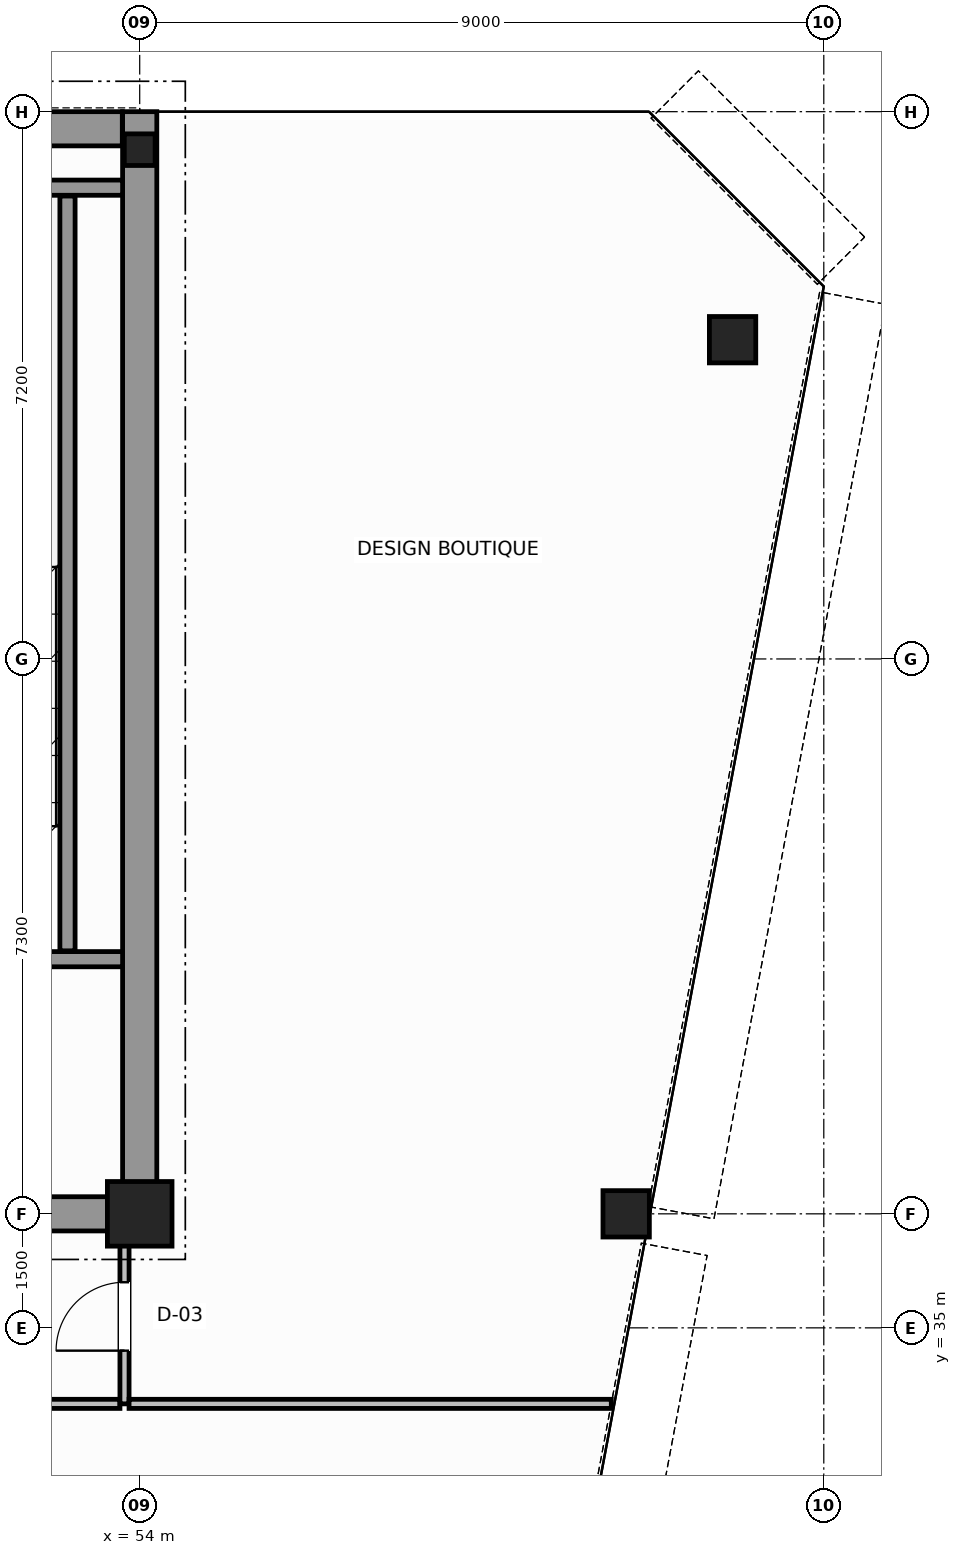
"""IFC4 building model, lengths in metres.
Left out: names, types, materials, properties, quantities, classifications, styles, units other than length and angle.
Written with IfcOpenShell. Run it as: python <this file> out.ifc"""

import sys

from ifc_helpers import new_model, si_unit, direction, frame, frame_2d, origin, origin_2d, place, context, subcontext, project, spatial, rectangle, hollow_circle, i_section, extrude, source, transform, mapped, element, fill, save


model = new_model("IFC4")
c1 = context("Model", 3, precision=1e-05, world=origin(), true_north=direction((0.0, 1.0)))
c2 = subcontext(c1, "Body", "Model", "MODEL_VIEW")
j1 = project(units=[si_unit("LENGTHUNIT", "METRE"), si_unit("PLANEANGLEUNIT", "RADIAN")], contexts=[c1])
p1 = place(None, origin())
s1 = spatial("IfcSite", under=j1, at=p1, CompositionType="ELEMENT")
p2 = place(p1, origin())
s2 = spatial("IfcBuilding", under=s1, at=p2, CompositionType="ELEMENT")
p3 = place(p2, frame((0.0, 0.0, 291.6)))
s3 = spatial("IfcBuildingStorey", under=s2, at=p3, CompositionType="ELEMENT", Elevation=291.6)
m1 = source(origin(), c2, "Body", "SweptSolid", [
    extrude(rectangle(XDim=0.85, YDim=0.85, at=origin_2d()), origin(), (0.0, 0.0, 1.0), 3.8),
])
p4 = place(p3, frame((54.0, 36.5, 0.0), z_axis=(0.0, 0.0, 1.0), x_axis=(1.0, 0.0, 0.0)))
e1 = element("IfcColumn", 1, at=p4, inside=s3, PredefinedType="COLUMN", context=c2, shape_type="MappedRepresentation", body=[
    mapped(m1, transform((0.0, 0.0, 0.0), scale=1.0)),
])
m2 = source(origin(), c2, "Body", "SweptSolid", [
    extrude(i_section(OverallWidth=0.406, OverallDepth=0.416, WebThickness=0.03, FlangeThickness=0.042, FilletRadius=0.015, at=origin_2d()), origin(), (0.0, 0.0, 1.0), 3.8),
])
p5 = place(p3, frame((54.0, 50.5, 0.0), z_axis=(0.0, 0.0, 1.0), x_axis=(1.0, 0.0, 0.0)))
e2 = element("IfcColumn", 2, at=p5, inside=s3, PredefinedType="COLUMN", context=c2, shape_type="MappedRepresentation", body=[
    mapped(m2, transform((0.0, 0.0, 0.0), scale=1.0)),
])
m3 = source(origin(), c2, "Body", "SweptSolid", [
    extrude(hollow_circle(Radius=0.305, WallThickness=0.03, at=origin_2d()), origin(), (0.0, 0.0, 1.0), 3.8),
])
for number, where, z_axis, x_axis in (
    (3, (61.8, 48.0, 0.0), (0.0, 0.0, 1.0), (1.0, 0.0, 0.0)),
    (4, (60.4, 36.5, 0.0), (0.0, 0.0, 1.0), (1.0, 0.0, 0.0)),
):
    element("IfcColumn", number, at=place(p3, frame(where, z_axis=z_axis, x_axis=x_axis)), inside=s3, PredefinedType="COLUMN", context=c2, shape_type="MappedRepresentation", body=[
        mapped(m3, transform((0.0, 0.0, 0.0), scale=1.0)),
    ])
p6 = place(p3, frame((34.002, 50.775, 0.0), z_axis=(0.0, 0.0, 1.0), x_axis=(1.0, 0.0, 0.0)))
e5 = element("IfcWall", 5, at=p6, inside=s3, PredefinedType="SHEAR", context=c2, shape_type="SweptSolid", body=[
    extrude(rectangle(XDim=19.769, YDim=0.45, at=frame_2d((9.885, 0.0))), origin(), (0.0, 0.0, 1.0), 3.8),
])
p7 = place(p3, frame((54.0, 36.5, 0.0), z_axis=(0.0, 0.0, 1.0), x_axis=(0.0, 1.0, 0.0)))
e6 = element("IfcWall", 6, at=p7, inside=s3, PredefinedType="SHEAR", context=c2, shape_type="SweptSolid", body=[
    extrude(rectangle(XDim=14.5, YDim=0.45, at=frame_2d((7.25, 0.0))), origin(), (0.0, 0.0, 1.0), 3.8),
])
p8 = place(p3, frame((49.8, 36.5, 0.0), z_axis=(0.0, 0.0, 1.0), x_axis=(1.0, 0.0, 0.0)))
e7 = element("IfcWall", 7, at=p8, inside=s3, PredefinedType="SHEAR", context=c2, shape_type="SweptSolid", body=[
    extrude(rectangle(XDim=3.955, YDim=0.45, at=frame_2d((1.978, 0.0))), origin(), (0.0, 0.0, 1.0), 2.58),
])
p9 = place(p3, frame((49.4, 39.85, 0.0), z_axis=(0.0, 0.0, 1.0), x_axis=(1.0, 0.0, 0.0)))
e8 = element("IfcWall", 8, at=p9, inside=s3, PredefinedType="SOLIDWALL", context=c2, shape_type="SweptSolid", body=[
    extrude(rectangle(XDim=4.375, YDim=0.2, at=frame_2d((2.188, 0.0))), origin(), (0.0, 0.0, 1.0), 3.8),
])
p10 = place(p9, frame((1.325, 0.0, 0.0)))
e9 = element("IfcOpeningElement", 9, at=p10, cuts=e8, PredefinedType="OPENING", context=c2, shape_type="SweptSolid", body=[
    extrude(rectangle(XDim=1.1, YDim=2.15, at=frame_2d((0.55, 1.075))), frame((0.0, 0.11, 0.0), z_axis=(0.0, -1.0, 0.0), x_axis=(1.0, 0.0, 0.0)), (0.0, 0.0, 1.0), 0.22),
])
p11 = place(p3, frame((49.4, 50.0, 0.0), z_axis=(0.0, 0.0, 1.0), x_axis=(1.0, 0.0, 0.0)))
e10 = element("IfcWall", 10, at=p11, inside=s3, PredefinedType="SOLIDWALL", context=c2, shape_type="SweptSolid", body=[
    extrude(rectangle(XDim=4.375, YDim=0.2, at=frame_2d((2.188, 0.0))), origin(), (0.0, 0.0, 1.0), 3.8),
])
p12 = place(p3, frame((53.05, 39.96, 0.0), z_axis=(0.0, 0.0, 1.0), x_axis=(0.0, 1.0, 0.0)))
e11 = element("IfcWall", 11, at=p12, inside=s3, PredefinedType="SOLIDWALL", context=c2, shape_type="SweptSolid", body=[
    extrude(rectangle(XDim=9.93, YDim=0.2, at=frame_2d((4.965, 0.0))), origin(), (0.0, 0.0, 1.0), 3.8),
])
p13 = place(p3, frame((34.86, 34.0, 0.0), z_axis=(0.0, 0.0, 1.0), x_axis=(1.0, 0.0, 0.0)))
e12 = element("IfcWall", 12, at=p13, inside=s3, PredefinedType="PARTITIONING", context=c2, shape_type="SweptSolid", body=[
    extrude(rectangle(XDim=18.88, YDim=0.12, at=frame_2d((9.44, 0.0))), origin(), (0.0, 0.0, 1.0), 3.58),
])
p14 = place(p3, frame((53.8, 34.0, 0.0), z_axis=(0.0, 0.0, 1.0), x_axis=(0.0, 1.0, 0.0)))
e13 = element("IfcWall", 13, at=p14, inside=s3, PredefinedType="PARTITIONING", context=c2, shape_type="SweptSolid", body=[
    extrude(rectangle(XDim=2.44, YDim=0.12, at=frame_2d((1.22, 0.0))), origin(), (0.0, 0.0, 1.0), 3.58),
])
p15 = place(p14, frame((0.7, 0.0, 0.0)))
e14 = element("IfcOpeningElement", 14, at=p15, cuts=e13, PredefinedType="OPENING", context=c2, shape_type="SweptSolid", body=[
    extrude(rectangle(XDim=0.9, YDim=2.15, at=frame_2d((0.45, 1.075))), frame((0.0, 0.07, 0.0), z_axis=(0.0, -1.0, 0.0), x_axis=(1.0, 0.0, 0.0)), (0.0, 0.0, 1.0), 0.14),
])
p16 = place(p3, frame((53.86, 34.0, 0.0), z_axis=(0.0, 0.0, 1.0), x_axis=(1.0, 0.0, 0.0)))
e15 = element("IfcWall", 15, at=p16, inside=s3, PredefinedType="PARTITIONING", context=c2, shape_type="SweptSolid", body=[
    extrude(rectangle(XDim=6.344, YDim=0.12, at=frame_2d((3.172, 0.0))), origin(), (0.0, 0.0, 1.0), 3.58),
])
m4 = source(origin(), c2, "Body", "SweptSolid", [
    extrude(rectangle(XDim=0.9, YDim=2.15, at=frame_2d((0.45, 1.075))), frame((0.0, 0.025, 0.0), z_axis=(0.0, -1.0, 0.0), x_axis=(1.0, 0.0, 0.0)), (0.0, 0.0, 1.0), 0.05),
])
p17 = place(p15, origin())
e16 = element("IfcDoor", 16, at=p17, inside=s3, OperationType="SINGLE_SWING_RIGHT", PredefinedType="DOOR", context=c2, shape_type="MappedRepresentation", body=[
    mapped(m4, transform((0.0, 0.0, 0.0), scale=1.0)),
])
fill(e14, e16)
save(model, sys.argv[1])
